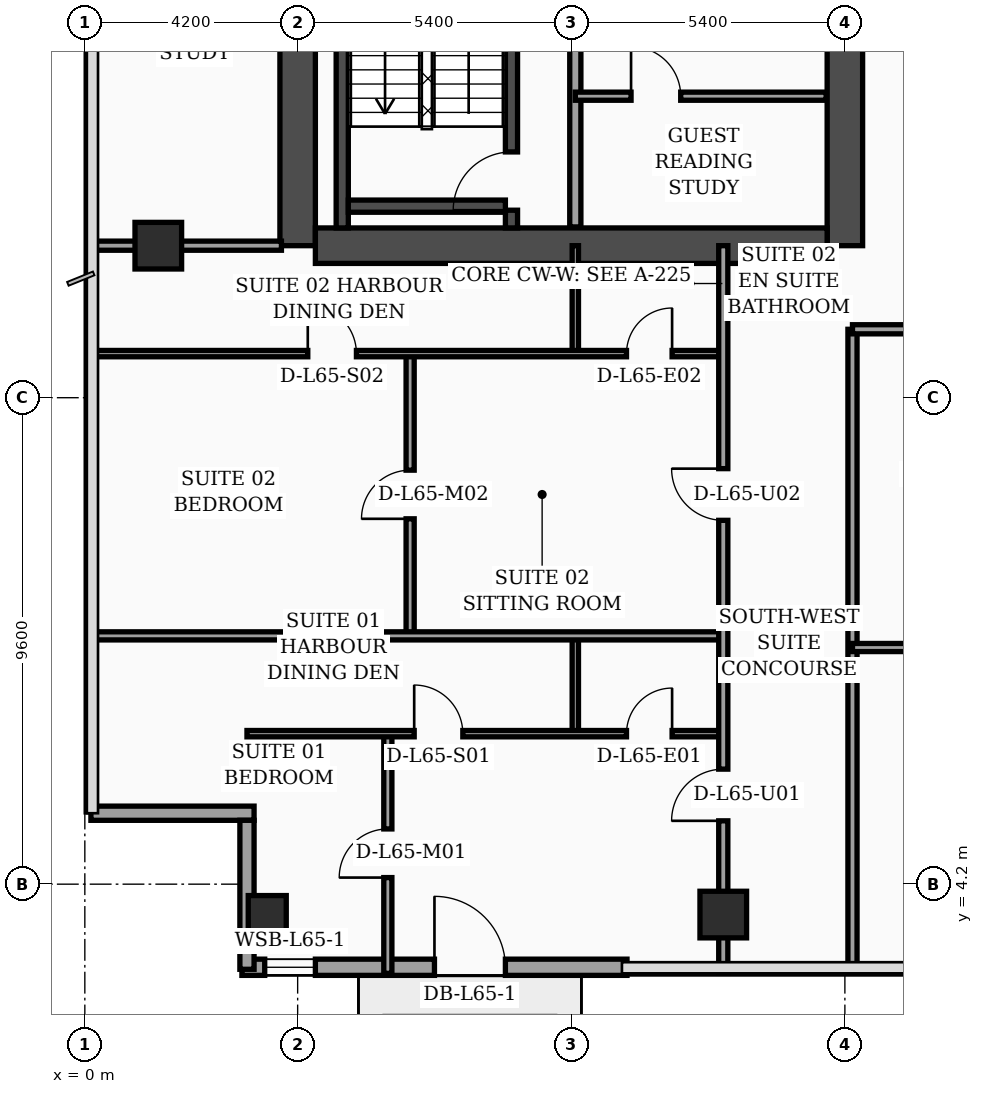
"""IFC4 building model, lengths in metres.
Left out: names, types, materials, properties, quantities, classifications, styles, units other than length and angle.
Written with IfcOpenShell. Run it as: python <this file> out.ifc"""

import sys

from ifc_helpers import new_model, si_unit, direction, frame, frame_2d, origin, origin_2d, place, context, subcontext, project, spatial, rectangle, hollow_rectangle, extrude, element, fill, save


model = new_model("IFC4")
c1 = context("Model", 3, precision=1e-05, world=origin(), true_north=direction((0.0, 1.0)))
c2 = subcontext(c1, "Body", "Model", "MODEL_VIEW")
j1 = project(units=[si_unit("LENGTHUNIT", "METRE"), si_unit("PLANEANGLEUNIT", "RADIAN")], contexts=[c1])
p1 = place(None, origin())
s1 = spatial("IfcSite", under=j1, at=p1, CompositionType="ELEMENT")
p2 = place(p1, origin())
s2 = spatial("IfcBuilding", under=s1, at=p2, CompositionType="ELEMENT")
p3 = place(p2, frame((0.0, 0.0, 263.5)))
s3 = spatial("IfcBuildingStorey", under=s2, at=p3, CompositionType="ELEMENT", Elevation=263.5)
p4 = place(p3, frame((4.2, 16.8, 0.0), z_axis=(0.0, 0.0, 1.0), x_axis=(0.0, 1.0, 0.0)))
e1 = element("IfcWall", 1, at=p4, inside=s3, PredefinedType="SHEAR", context=c2, shape_type="SweptSolid", body=[
    extrude(rectangle(XDim=21.6, YDim=0.7, at=frame_2d((10.8, 0.0))), origin(), (0.0, 0.0, 1.0), 3.56),
])
p5 = place(p3, frame((15.0, 16.8, 0.0), z_axis=(0.0, 0.0, 1.0), x_axis=(0.0, 1.0, 0.0)))
e2 = element("IfcWall", 2, at=p5, inside=s3, PredefinedType="SHEAR", context=c2, shape_type="SweptSolid", body=[
    extrude(rectangle(XDim=21.6, YDim=0.7, at=frame_2d((10.8, 0.0))), origin(), (0.0, 0.0, 1.0), 3.56),
])
p6 = place(p5, frame((8.65, 0.0, 0.0)))
e3 = element("IfcOpeningElement", 3, at=p6, cuts=e2, PredefinedType="OPENING", context=c2, shape_type="SweptSolid", body=[
    extrude(rectangle(XDim=1.1, YDim=2.2, at=frame_2d((0.55, 1.1))), frame((0.0, 0.36, 0.0), z_axis=(0.0, -1.0, 0.0), x_axis=(1.0, 0.0, 0.0)), (0.0, 0.0, 1.0), 0.72),
])
p7 = place(p5, frame((18.9, 0.0, 0.0)))
e4 = element("IfcOpeningElement", 4, at=p7, cuts=e2, PredefinedType="OPENING", context=c2, shape_type="SweptSolid", body=[
    extrude(rectangle(XDim=1.1, YDim=2.2, at=frame_2d((0.55, 1.1))), frame((0.0, 0.36, 0.0), z_axis=(0.0, -1.0, 0.0), x_axis=(1.0, 0.0, 0.0)), (0.0, 0.0, 1.0), 0.72),
])
p8 = place(p3, frame((4.55, 16.8, 0.0), z_axis=(0.0, 0.0, 1.0), x_axis=(1.0, 0.0, 0.0)))
e5 = element("IfcWall", 5, at=p8, inside=s3, PredefinedType="SHEAR", context=c2, shape_type="SweptSolid", body=[
    extrude(rectangle(XDim=10.1, YDim=0.7, at=frame_2d((5.05, 0.0))), origin(), (0.0, 0.0, 1.0), 3.56),
])
p9 = place(p3, frame((5.08, 17.15, 0.0), z_axis=(0.0, 0.0, 1.0), x_axis=(0.0, 1.0, 0.0)))
e6 = element("IfcWall", 6, at=p9, inside=s3, PredefinedType="SOLIDWALL", context=c2, shape_type="SweptSolid", body=[
    extrude(rectangle(XDim=9.64, YDim=0.24, at=frame_2d((4.82, 0.0))), origin(), (0.0, 0.0, 1.0), 3.56),
])
p10 = place(p3, frame((8.42, 17.15, 0.0), z_axis=(0.0, 0.0, 1.0), x_axis=(0.0, 1.0, 0.0)))
e7 = element("IfcWall", 7, at=p10, inside=s3, PredefinedType="SOLIDWALL", context=c2, shape_type="SweptSolid", body=[
    extrude(rectangle(XDim=9.64, YDim=0.24, at=frame_2d((4.82, 0.0))), origin(), (0.0, 0.0, 1.0), 3.56),
])
p11 = place(p10, frame((0.35, 0.0, 0.0)))
e8 = element("IfcOpeningElement", 8, at=p11, cuts=e7, PredefinedType="OPENING", context=c2, shape_type="SweptSolid", body=[
    extrude(rectangle(XDim=1.15, YDim=2.2, at=frame_2d((0.575, 1.1))), frame((0.0, 0.13, 0.0), z_axis=(0.0, -1.0, 0.0), x_axis=(1.0, 0.0, 0.0)), (0.0, 0.0, 1.0), 0.26),
])
p12 = place(p3, frame((5.2, 17.58, 0.0), z_axis=(0.0, 0.0, 1.0), x_axis=(1.0, 0.0, 0.0)))
e9 = element("IfcWall", 9, at=p12, inside=s3, PredefinedType="SOLIDWALL", context=c2, shape_type="SweptSolid", body=[
    extrude(rectangle(XDim=3.1, YDim=0.24, at=frame_2d((1.55, 0.0))), origin(), (0.0, 0.0, 1.0), 3.56),
])
p13 = place(p3, frame((3.6, 3.6, 0.0), z_axis=(0.0, 0.0, 1.0), x_axis=(1.0, 0.0, 0.0)))
e10 = element("IfcColumn", 10, at=p13, inside=s3, PredefinedType="COLUMN", context=c2, shape_type="SweptSolid", body=[
    extrude(hollow_rectangle(XDim=0.75, YDim=0.75, WallThickness=0.032, at=origin_2d()), origin(), (0.0, 0.0, 1.0), 3.56),
])
for number, where, z_axis, x_axis in (
    (11, (1.45, 16.8, 0.0), (0.0, 0.0, 1.0), (1.0, 0.0, 0.0)),
    (12, (12.6, 3.6, 0.0), (0.0, 0.0, 1.0), (1.0, 0.0, 0.0)),
):
    element("IfcColumn", number, at=place(p3, frame(where, z_axis=z_axis, x_axis=x_axis)), inside=s3, PredefinedType="COLUMN", context=c2, shape_type="SweptSolid", body=[
        extrude(rectangle(XDim=0.92, YDim=0.92, at=origin_2d()), origin(), (0.0, 0.0, 1.0), 3.56),
    ])
p14 = place(p3, frame((3.1, 2.56, 0.0), z_axis=(0.0, 0.0, 1.0), x_axis=(1.0, 0.0, 0.0)))
e13 = element("IfcWall", 13, at=p14, inside=s3, PredefinedType="SOLIDWALL", context=c2, shape_type="SweptSolid", body=[
    extrude(rectangle(XDim=7.6, YDim=0.32, at=frame_2d((3.8, 0.0))), origin(), (0.0, 0.0, 1.0), 3.56),
])
p15 = place(p14, frame((0.45, 0.0, 0.75)))
e14 = element("IfcOpeningElement", 14, at=p15, cuts=e13, PredefinedType="OPENING", context=c2, shape_type="SweptSolid", body=[
    extrude(rectangle(XDim=1.0, YDim=1.6, at=frame_2d((0.5, 0.8))), frame((0.0, 0.17, 0.0), z_axis=(0.0, -1.0, 0.0), x_axis=(1.0, 0.0, 0.0)), (0.0, 0.0, 1.0), 0.34),
])
p16 = place(p14, frame((3.8, 0.0, 0.0)))
e15 = element("IfcOpeningElement", 15, at=p16, cuts=e13, PredefinedType="OPENING", context=c2, shape_type="SweptSolid", body=[
    extrude(rectangle(XDim=1.4, YDim=2.25, at=frame_2d((0.7, 1.125))), frame((0.0, 0.17, 0.0), z_axis=(0.0, -1.0, 0.0), x_axis=(1.0, 0.0, 0.0)), (0.0, 0.0, 1.0), 0.34),
])
p17 = place(p3, frame((0.12, 5.6, 0.0), z_axis=(0.0, 0.0, 1.0), x_axis=(1.0, 0.0, 0.0)))
e16 = element("IfcWall", 16, at=p17, inside=s3, PredefinedType="SOLIDWALL", context=c2, shape_type="SweptSolid", body=[
    extrude(rectangle(XDim=3.22, YDim=0.28, at=frame_2d((1.61, 0.0))), origin(), (0.0, 0.0, 1.0), 2.99),
])
p18 = place(p3, frame((3.2, 5.46, 0.0), z_axis=(0.0, 0.0, 1.0), x_axis=(0.0, -1.0, 0.0)))
e17 = element("IfcWall", 17, at=p18, inside=s3, PredefinedType="SOLIDWALL", context=c2, shape_type="SweptSolid", body=[
    extrude(rectangle(XDim=2.94, YDim=0.28, at=frame_2d((1.47, 0.0))), origin(), (0.0, 0.0, 1.0), 2.99),
])
p19 = place(p3, frame((9.68, 17.17, 0.0), z_axis=(0.0, 0.0, 1.0), x_axis=(0.0, 1.0, 0.0)))
e18 = element("IfcWall", 18, at=p19, inside=s3, PredefinedType="SOLIDWALL", context=c2, shape_type="SweptSolid", body=[
    extrude(rectangle(XDim=7.83, YDim=0.22, at=frame_2d((3.915, 0.0))), origin(), (0.0, 0.0, 1.0), 3.56),
])
p20 = place(p3, frame((9.68, 19.75, 0.0), z_axis=(0.0, 0.0, 1.0), x_axis=(1.0, 0.0, 0.0)))
e19 = element("IfcWall", 19, at=p20, inside=s3, PredefinedType="PARTITIONING", context=c2, shape_type="SweptSolid", body=[
    extrude(rectangle(XDim=4.95, YDim=0.16, at=frame_2d((2.475, 0.0))), origin(), (0.0, 0.0, 1.0), 3.56),
])
p21 = place(p20, frame((1.1, 0.0, 0.0)))
e20 = element("IfcOpeningElement", 20, at=p21, cuts=e19, PredefinedType="OPENING", context=c2, shape_type="SweptSolid", body=[
    extrude(rectangle(XDim=0.98, YDim=2.15, at=frame_2d((0.49, 1.075))), frame((0.0, 0.09, 0.0), z_axis=(0.0, -1.0, 0.0), x_axis=(1.0, 0.0, 0.0)), (0.0, 0.0, 1.0), 0.18),
])
p22 = place(p3, frame((0.08, 16.8, 0.0), z_axis=(0.0, 0.0, 1.0), x_axis=(1.0, 0.0, 0.0)))
e21 = element("IfcWall", 21, at=p22, inside=s3, PredefinedType="PARTITIONING", context=c2, shape_type="SweptSolid", body=[
    extrude(rectangle(XDim=3.8, YDim=0.18, at=frame_2d((1.9, 0.0))), origin(), (0.0, 0.0, 1.0), 2.99),
])
p23 = place(p3, frame((9.68, 7.17, 0.0), z_axis=(0.0, 0.0, 1.0), x_axis=(0.0, 1.0, 0.0)))
e22 = element("IfcWall", 22, at=p23, inside=s3, PredefinedType="PARTITIONING", context=c2, shape_type="SweptSolid", body=[
    extrude(rectangle(XDim=1.93, YDim=0.125, at=frame_2d((0.965, 0.0))), origin(), (0.0, 0.0, 1.0), 3.09),
])
p24 = place(p3, frame((5.98, 2.44, 0.0), z_axis=(0.0, 0.0, 1.0), x_axis=(0.0, 1.0, 0.0)))
e23 = element("IfcWall", 23, at=p24, inside=s3, PredefinedType="PARTITIONING", context=c2, shape_type="SweptSolid", body=[
    extrude(rectangle(XDim=4.73, YDim=0.16, at=frame_2d((2.365, 0.0))), origin(), (0.0, 0.0, 1.0), 3.09),
])
p25 = place(p24, frame((1.89, 0.0, 0.0)))
e24 = element("IfcOpeningElement", 24, at=p25, cuts=e23, PredefinedType="OPENING", context=c2, shape_type="SweptSolid", body=[
    extrude(rectangle(XDim=0.96, YDim=2.2, at=frame_2d((0.48, 1.1))), frame((0.0, 0.09, 0.0), z_axis=(0.0, -1.0, 0.0), x_axis=(1.0, 0.0, 0.0)), (0.0, 0.0, 1.0), 0.18),
])
p26 = place(p3, frame((3.2, 7.17, 0.0), z_axis=(0.0, 0.0, 1.0), x_axis=(1.0, 0.0, 0.0)))
e25 = element("IfcWall", 25, at=p26, inside=s3, PredefinedType="PARTITIONING", context=c2, shape_type="SweptSolid", body=[
    extrude(rectangle(XDim=9.4, YDim=0.125, at=frame_2d((4.7, 0.0))), origin(), (0.0, 0.0, 1.0), 2.99),
])
p27 = place(p26, frame((3.3, 0.0, 0.0)))
e26 = element("IfcOpeningElement", 26, at=p27, cuts=e25, PredefinedType="OPENING", context=c2, shape_type="SweptSolid", body=[
    extrude(rectangle(XDim=0.96, YDim=2.2, at=frame_2d((0.48, 1.1))), frame((0.0, 0.073, 0.0), z_axis=(0.0, -1.0, 0.0), x_axis=(1.0, 0.0, 0.0)), (0.0, 0.0, 1.0), 0.145),
])
p28 = place(p26, frame((7.49, 0.0, 0.0)))
e27 = element("IfcOpeningElement", 27, at=p28, cuts=e25, PredefinedType="OPENING", context=c2, shape_type="SweptSolid", body=[
    extrude(rectangle(XDim=0.9, YDim=2.15, at=frame_2d((0.45, 1.075))), frame((0.0, 0.073, 0.0), z_axis=(0.0, -1.0, 0.0), x_axis=(1.0, 0.0, 0.0)), (0.0, 0.0, 1.0), 0.145),
])
p29 = place(p3, frame((9.68, 14.67, 0.0), z_axis=(0.0, 0.0, 1.0), x_axis=(0.0, 1.0, 0.0)))
e28 = element("IfcWall", 28, at=p29, inside=s3, PredefinedType="PARTITIONING", context=c2, shape_type="SweptSolid", body=[
    extrude(rectangle(XDim=2.13, YDim=0.125, at=frame_2d((1.065, 0.0))), origin(), (0.0, 0.0, 1.0), 3.56),
])
p30 = place(p3, frame((6.42, 9.1, 0.0), z_axis=(0.0, 0.0, 1.0), x_axis=(0.0, 1.0, 0.0)))
e29 = element("IfcWall", 29, at=p30, inside=s3, PredefinedType="PARTITIONING", context=c2, shape_type="SweptSolid", body=[
    extrude(rectangle(XDim=5.57, YDim=0.16, at=frame_2d((2.785, 0.0))), origin(), (0.0, 0.0, 1.0), 3.14),
])
p31 = place(p30, frame((2.31, 0.0, 0.0)))
e30 = element("IfcOpeningElement", 30, at=p31, cuts=e29, PredefinedType="OPENING", context=c2, shape_type="SweptSolid", body=[
    extrude(rectangle(XDim=0.96, YDim=2.2, at=frame_2d((0.48, 1.1))), frame((0.0, 0.09, 0.0), z_axis=(0.0, -1.0, 0.0), x_axis=(1.0, 0.0, 0.0)), (0.0, 0.0, 1.0), 0.18),
])
p32 = place(p3, frame((0.08, 14.67, 0.0), z_axis=(0.0, 0.0, 1.0), x_axis=(1.0, 0.0, 0.0)))
e31 = element("IfcWall", 31, at=p32, inside=s3, PredefinedType="PARTITIONING", context=c2, shape_type="SweptSolid", body=[
    extrude(rectangle(XDim=12.52, YDim=0.125, at=frame_2d((6.26, 0.0))), origin(), (0.0, 0.0, 1.0), 2.99),
])
p33 = place(p32, frame((4.32, 0.0, 0.0)))
e32 = element("IfcOpeningElement", 32, at=p33, cuts=e31, PredefinedType="OPENING", context=c2, shape_type="SweptSolid", body=[
    extrude(rectangle(XDim=0.96, YDim=2.2, at=frame_2d((0.48, 1.1))), frame((0.0, 0.073, 0.0), z_axis=(0.0, -1.0, 0.0), x_axis=(1.0, 0.0, 0.0)), (0.0, 0.0, 1.0), 0.145),
])
p34 = place(p32, frame((10.61, 0.0, 0.0)))
e33 = element("IfcOpeningElement", 33, at=p34, cuts=e31, PredefinedType="OPENING", context=c2, shape_type="SweptSolid", body=[
    extrude(rectangle(XDim=0.9, YDim=2.15, at=frame_2d((0.45, 1.075))), frame((0.0, 0.073, 0.0), z_axis=(0.0, -1.0, 0.0), x_axis=(1.0, 0.0, 0.0)), (0.0, 0.0, 1.0), 0.145),
])
p35 = place(p3, frame((0.08, 9.1, 0.0), z_axis=(0.0, 0.0, 1.0), x_axis=(1.0, 0.0, 0.0)))
e34 = element("IfcWall", 34, at=p35, inside=s3, PredefinedType="PARTITIONING", context=c2, shape_type="SweptSolid", body=[
    extrude(rectangle(XDim=12.52, YDim=0.16, at=frame_2d((6.26, 0.0))), origin(), (0.0, 0.0, 1.0), 2.99),
])
p36 = place(p3, frame((12.6, 2.44, 0.0), z_axis=(0.0, 0.0, 1.0), x_axis=(0.0, 1.0, 0.0)))
e35 = element("IfcWall", 35, at=p36, inside=s3, PredefinedType="PARTITIONING", context=c2, shape_type="SweptSolid", body=[
    extrude(rectangle(XDim=14.36, YDim=0.18, at=frame_2d((7.18, 0.0))), origin(), (0.0, 0.0, 1.0), 2.99),
])
p37 = place(p36, frame((3.01, 0.0, 0.0)))
e36 = element("IfcOpeningElement", 36, at=p37, cuts=e35, PredefinedType="OPENING", context=c2, shape_type="SweptSolid", body=[
    extrude(rectangle(XDim=1.02, YDim=2.2, at=frame_2d((0.51, 1.1))), frame((0.0, 0.1, 0.0), z_axis=(0.0, -1.0, 0.0), x_axis=(1.0, 0.0, 0.0)), (0.0, 0.0, 1.0), 0.2),
])
p38 = place(p36, frame((8.94, 0.0, 0.0)))
e37 = element("IfcOpeningElement", 37, at=p38, cuts=e35, PredefinedType="OPENING", context=c2, shape_type="SweptSolid", body=[
    extrude(rectangle(XDim=1.02, YDim=2.2, at=frame_2d((0.51, 1.1))), frame((0.0, 0.1, 0.0), z_axis=(0.0, -1.0, 0.0), x_axis=(1.0, 0.0, 0.0)), (0.0, 0.0, 1.0), 0.2),
])
p39 = place(p3, frame((15.15, 2.44, 0.0), z_axis=(0.0, 0.0, 1.0), x_axis=(0.0, 1.0, 0.0)))
e38 = element("IfcWall", 38, at=p39, inside=s3, PredefinedType="PARTITIONING", context=c2, shape_type="SweptSolid", body=[
    extrude(rectangle(XDim=12.71, YDim=0.18, at=frame_2d((6.355, 0.0))), origin(), (0.0, 0.0, 1.0), 3.09),
])
p40 = place(p3, frame((15.15, 8.87, 0.0), z_axis=(0.0, 0.0, 1.0), x_axis=(1.0, 0.0, 0.0)))
e39 = element("IfcWall", 39, at=p40, inside=s3, PredefinedType="PARTITIONING", context=c2, shape_type="SweptSolid", body=[
    extrude(rectangle(XDim=4.45, YDim=0.16, at=frame_2d((2.225, 0.0))), origin(), (0.0, 0.0, 1.0), 3.56),
])
p41 = place(p40, frame((1.75, 0.0, 0.0)))
e40 = element("IfcOpeningElement", 40, at=p41, cuts=e39, PredefinedType="OPENING", context=c2, shape_type="SweptSolid", body=[
    extrude(rectangle(XDim=0.96, YDim=2.2, at=frame_2d((0.48, 1.1))), frame((0.0, 0.09, 0.0), z_axis=(0.0, -1.0, 0.0), x_axis=(1.0, 0.0, 0.0)), (0.0, 0.0, 1.0), 0.18),
])
p42 = place(p3, frame((15.15, 15.15, 0.0), z_axis=(0.0, 0.0, 1.0), x_axis=(1.0, 0.0, 0.0)))
e41 = element("IfcWall", 41, at=p42, inside=s3, PredefinedType="PARTITIONING", context=c2, shape_type="SweptSolid", body=[
    extrude(rectangle(XDim=6.45, YDim=0.18, at=frame_2d((3.225, 0.0))), origin(), (0.0, 0.0, 1.0), 2.59),
])
p43 = place(p42, frame((1.74, 0.0, 0.0)))
e42 = element("IfcOpeningElement", 42, at=p43, cuts=e41, PredefinedType="OPENING", context=c2, shape_type="SweptSolid", body=[
    extrude(rectangle(XDim=1.02, YDim=2.2, at=frame_2d((0.51, 1.1))), frame((0.0, 0.1, 0.0), z_axis=(0.0, -1.0, 0.0), x_axis=(1.0, 0.0, 0.0)), (0.0, 0.0, 1.0), 0.2),
])
p44 = place(p15, origin())
e43 = element("IfcWindow", 43, at=p44, inside=s3, PartitioningType="SINGLE_PANEL", PredefinedType="WINDOW", context=c2, shape_type="SweptSolid", body=[
    extrude(rectangle(XDim=1.0, YDim=1.6, at=frame_2d((0.5, 0.8))), frame((0.0, 0.03, 0.0), z_axis=(0.0, -1.0, 0.0), x_axis=(1.0, 0.0, 0.0)), (0.0, 0.0, 1.0), 0.06),
])
fill(e14, e43)
p45 = place(p16, origin())
e44 = element("IfcDoor", 44, at=p45, inside=s3, OperationType="SINGLE_SWING_LEFT", PredefinedType="DOOR", context=c2, shape_type="SweptSolid", body=[
    extrude(rectangle(XDim=1.4, YDim=2.25, at=frame_2d((0.7, 1.125))), frame((0.0, 0.025, 0.0), z_axis=(0.0, -1.0, 0.0), x_axis=(1.0, 0.0, 0.0)), (0.0, 0.0, 1.0), 0.05),
])
fill(e15, e44)
p46 = place(p21, origin())
e45 = element("IfcDoor", 45, at=p46, inside=s3, OperationType="SINGLE_SWING_LEFT", PredefinedType="DOOR", context=c2, shape_type="SweptSolid", body=[
    extrude(rectangle(XDim=0.98, YDim=2.15, at=frame_2d((0.49, 1.075))), frame((0.0, 0.025, 0.0), z_axis=(0.0, -1.0, 0.0), x_axis=(1.0, 0.0, 0.0)), (0.0, 0.0, 1.0), 0.05),
])
fill(e20, e45)
p47 = place(p25, origin())
e46 = element("IfcDoor", 46, at=p47, inside=s3, OperationType="SINGLE_SWING_LEFT", PredefinedType="DOOR", context=c2, shape_type="SweptSolid", body=[
    extrude(rectangle(XDim=0.96, YDim=2.2, at=frame_2d((0.48, 1.1))), frame((0.0, 0.025, 0.0), z_axis=(0.0, -1.0, 0.0), x_axis=(1.0, 0.0, 0.0)), (0.0, 0.0, 1.0), 0.05),
])
fill(e24, e46)
p48 = place(p27, origin())
e47 = element("IfcDoor", 47, at=p48, inside=s3, OperationType="SINGLE_SWING_LEFT", PredefinedType="DOOR", context=c2, shape_type="SweptSolid", body=[
    extrude(rectangle(XDim=0.96, YDim=2.2, at=frame_2d((0.48, 1.1))), frame((0.0, 0.025, 0.0), z_axis=(0.0, -1.0, 0.0), x_axis=(1.0, 0.0, 0.0)), (0.0, 0.0, 1.0), 0.05),
])
fill(e26, e47)
p49 = place(p28, origin())
e48 = element("IfcDoor", 48, at=p49, inside=s3, OperationType="SINGLE_SWING_RIGHT", PredefinedType="DOOR", context=c2, shape_type="SweptSolid", body=[
    extrude(rectangle(XDim=0.9, YDim=2.15, at=frame_2d((0.45, 1.075))), frame((0.0, 0.025, 0.0), z_axis=(0.0, -1.0, 0.0), x_axis=(1.0, 0.0, 0.0)), (0.0, 0.0, 1.0), 0.05),
])
fill(e27, e48)
p50 = place(p31, origin())
e49 = element("IfcDoor", 49, at=p50, inside=s3, OperationType="SINGLE_SWING_LEFT", PredefinedType="DOOR", context=c2, shape_type="SweptSolid", body=[
    extrude(rectangle(XDim=0.96, YDim=2.2, at=frame_2d((0.48, 1.1))), frame((0.0, 0.025, 0.0), z_axis=(0.0, -1.0, 0.0), x_axis=(1.0, 0.0, 0.0)), (0.0, 0.0, 1.0), 0.05),
])
fill(e30, e49)
p51 = place(p33, origin())
e50 = element("IfcDoor", 50, at=p51, inside=s3, OperationType="SINGLE_SWING_LEFT", PredefinedType="DOOR", context=c2, shape_type="SweptSolid", body=[
    extrude(rectangle(XDim=0.96, YDim=2.2, at=frame_2d((0.48, 1.1))), frame((0.0, 0.025, 0.0), z_axis=(0.0, -1.0, 0.0), x_axis=(1.0, 0.0, 0.0)), (0.0, 0.0, 1.0), 0.05),
])
fill(e32, e50)
p52 = place(p34, origin())
e51 = element("IfcDoor", 51, at=p52, inside=s3, OperationType="SINGLE_SWING_RIGHT", PredefinedType="DOOR", context=c2, shape_type="SweptSolid", body=[
    extrude(rectangle(XDim=0.9, YDim=2.15, at=frame_2d((0.45, 1.075))), frame((0.0, 0.025, 0.0), z_axis=(0.0, -1.0, 0.0), x_axis=(1.0, 0.0, 0.0)), (0.0, 0.0, 1.0), 0.05),
])
fill(e33, e51)
p53 = place(p37, origin())
e52 = element("IfcDoor", 52, at=p53, inside=s3, OperationType="SINGLE_SWING_LEFT", PredefinedType="DOOR", context=c2, shape_type="SweptSolid", body=[
    extrude(rectangle(XDim=1.02, YDim=2.2, at=frame_2d((0.51, 1.1))), frame((0.0, 0.025, 0.0), z_axis=(0.0, -1.0, 0.0), x_axis=(1.0, 0.0, 0.0)), (0.0, 0.0, 1.0), 0.05),
])
fill(e36, e52)
p54 = place(p38, origin())
e53 = element("IfcDoor", 53, at=p54, inside=s3, OperationType="SINGLE_SWING_RIGHT", PredefinedType="DOOR", context=c2, shape_type="SweptSolid", body=[
    extrude(rectangle(XDim=1.02, YDim=2.2, at=frame_2d((0.51, 1.1))), frame((0.0, 0.025, 0.0), z_axis=(0.0, -1.0, 0.0), x_axis=(1.0, 0.0, 0.0)), (0.0, 0.0, 1.0), 0.05),
])
fill(e37, e53)
p55 = place(p11, origin())
e54 = element("IfcDoor", 54, at=p55, inside=s3, OperationType="SINGLE_SWING_LEFT", PredefinedType="DOOR", context=c2, shape_type="SweptSolid", body=[
    extrude(rectangle(XDim=1.15, YDim=2.2, at=frame_2d((0.575, 1.1))), frame((0.0, 0.025, 0.0), z_axis=(0.0, -1.0, 0.0), x_axis=(1.0, 0.0, 0.0)), (0.0, 0.0, 1.0), 0.05),
])
fill(e8, e54)
save(model, sys.argv[1])
